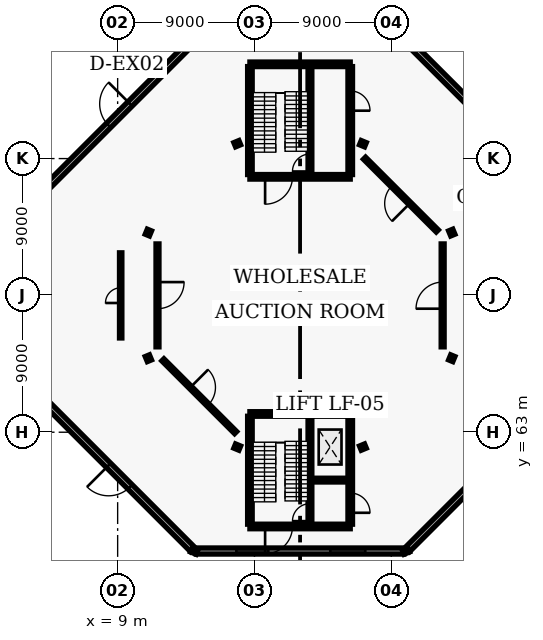
"""IFC4 building model, lengths in metres.
Left out: names, types, materials, properties, quantities, classifications, styles, units other than length and angle.
Written with IfcOpenShell. Run it as: python <this file> out.ifc"""

import sys

from ifc_helpers import new_model, si_unit, direction, frame, frame_2d, origin, origin_2d, place, context, subcontext, project, spatial, rectangle, i_section, extrude, element, fill, save


model = new_model("IFC4")
c1 = context("Model", 3, precision=1e-05, world=origin(), true_north=direction((0.0, 1.0)))
c2 = subcontext(c1, "Body", "Model", "MODEL_VIEW")
j1 = project(units=[si_unit("LENGTHUNIT", "METRE"), si_unit("PLANEANGLEUNIT", "RADIAN")], contexts=[c1])
p1 = place(None, origin())
s1 = spatial("IfcSite", under=j1, at=p1, CompositionType="ELEMENT")
p2 = place(p1, origin())
s2 = spatial("IfcBuilding", under=s1, at=p2, CompositionType="ELEMENT")
p3 = place(p2, origin())
s3 = spatial("IfcBuildingStorey", under=s2, at=p3, CompositionType="ELEMENT", Elevation=0.0)
for number, where, z_axis, x_axis in (
    (1, (30.978, 76.133, 0.0), (0.0, 0.0, 1.0), (0.924, 0.383, 0.0)),
    (2, (25.133, 81.978, 0.0), (0.0, 0.0, 1.0), (0.383, 0.924, 0.0)),
    (3, (16.867, 81.978, 0.0), (0.0, 0.0, 1.0), (-0.383, 0.924, 0.0)),
    (4, (11.022, 76.133, 0.0), (0.0, 0.0, 1.0), (-0.924, 0.383, 0.0)),
    (5, (11.022, 67.867, 0.0), (0.0, 0.0, 1.0), (-0.924, -0.383, 0.0)),
    (6, (16.867, 62.022, 0.0), (0.0, 0.0, 1.0), (-0.383, -0.924, 0.0)),
):
    element("IfcColumn", number, at=place(p3, frame(where, z_axis=z_axis, x_axis=x_axis)), inside=s3, PredefinedType="COLUMN", context=c2, shape_type="SweptSolid", body=[
        extrude(i_section(OverallWidth=0.3, OverallDepth=0.36, WebThickness=0.012, FlangeThickness=0.022, FilletRadius=0.027, at=origin_2d()), origin(), (0.0, 0.0, 1.0), 5.4),
    ])
p4 = place(p3, frame((14.035, 55.185, 0.0), z_axis=(0.0, 0.0, 1.0), x_axis=(-0.382683432365, -0.923879532511, 0.0)))
e7 = element("IfcColumn", 7, at=p4, inside=s3, PredefinedType="COLUMN", context=c2, shape_type="SweptSolid", body=[
    extrude(i_section(OverallWidth=0.3, OverallDepth=0.4, WebThickness=0.013, FlangeThickness=0.024, FilletRadius=0.027, at=origin_2d()), origin(), (0.0, 0.0, 1.0), 5.4),
])
p5 = place(p3, frame((25.133, 62.022, 0.0), z_axis=(0.0, 0.0, 1.0), x_axis=(0.382683432365, -0.923879532511, 0.0)))
e8 = element("IfcColumn", 8, at=p5, inside=s3, PredefinedType="COLUMN", context=c2, shape_type="SweptSolid", body=[
    extrude(i_section(OverallWidth=0.3, OverallDepth=0.36, WebThickness=0.012, FlangeThickness=0.022, FilletRadius=0.027, at=origin_2d()), origin(), (0.0, 0.0, 1.0), 5.4),
])
p6 = place(p3, frame((27.965, 55.185, 0.0), z_axis=(0.0, 0.0, 1.0), x_axis=(0.382683432365, -0.923879532511, 0.0)))
e9 = element("IfcColumn", 9, at=p6, inside=s3, PredefinedType="COLUMN", context=c2, shape_type="SweptSolid", body=[
    extrude(i_section(OverallWidth=0.3, OverallDepth=0.4, WebThickness=0.013, FlangeThickness=0.024, FilletRadius=0.027, at=origin_2d()), origin(), (0.0, 0.0, 1.0), 5.4),
])
p7 = place(p3, frame((30.978, 67.867, 0.0), z_axis=(0.0, 0.0, 1.0), x_axis=(0.923879532511, -0.382683432365, 0.0)))
e10 = element("IfcColumn", 10, at=p7, inside=s3, PredefinedType="COLUMN", context=c2, shape_type="SweptSolid", body=[
    extrude(i_section(OverallWidth=0.3, OverallDepth=0.36, WebThickness=0.012, FlangeThickness=0.022, FilletRadius=0.027, at=origin_2d()), origin(), (0.0, 0.0, 1.0), 5.4),
])
p8 = place(p3, frame((37.716, 79.064, 0.0), z_axis=(0.0, 0.0, 1.0), x_axis=(-0.707106781187, 0.707106781187, 0.0)))
e11 = element("IfcWall", 11, at=p8, inside=s3, PredefinedType="SOLIDWALL", context=c2, shape_type="SweptSolid", body=[
    extrude(rectangle(XDim=13.65, YDim=0.4, at=frame_2d((6.825, 0.0))), origin(), (0.0, 0.0, 1.0), 4.35),
])
p9 = place(p8, frame((5.825, 0.0, 0.0)))
e12 = element("IfcOpeningElement", 12, at=p9, cuts=e11, PredefinedType="OPENING", context=c2, shape_type="SweptSolid", body=[
    extrude(rectangle(XDim=2.0, YDim=2.3, at=frame_2d((1.0, 1.15))), frame((0.0, 0.21, 0.0), z_axis=(0.0, -1.0, 0.0), x_axis=(1.0, 0.0, 0.0)), (0.0, 0.0, 1.0), 0.42),
])
p10 = place(p3, frame((13.936, 88.716, 0.0), z_axis=(0.0, 0.0, 1.0), x_axis=(-0.707106781187, -0.707106781187, 0.0)))
e13 = element("IfcWall", 13, at=p10, inside=s3, PredefinedType="SOLIDWALL", context=c2, shape_type="SweptSolid", body=[
    extrude(rectangle(XDim=13.65, YDim=0.4, at=frame_2d((6.825, 0.0))), origin(), (0.0, 0.0, 1.0), 4.35),
])
p11 = place(p10, frame((5.825, 0.0, 0.0)))
e14 = element("IfcOpeningElement", 14, at=p11, cuts=e13, PredefinedType="OPENING", context=c2, shape_type="SweptSolid", body=[
    extrude(rectangle(XDim=2.0, YDim=2.3, at=frame_2d((1.0, 1.15))), frame((0.0, 0.21, 0.0), z_axis=(0.0, -1.0, 0.0), x_axis=(1.0, 0.0, 0.0)), (0.0, 0.0, 1.0), 0.42),
])
p12 = place(p3, frame((4.284, 64.936, 0.0), z_axis=(0.0, 0.0, 1.0), x_axis=(0.707106781187, -0.707106781187, 0.0)))
e15 = element("IfcWall", 15, at=p12, inside=s3, PredefinedType="SOLIDWALL", context=c2, shape_type="SweptSolid", body=[
    extrude(rectangle(XDim=13.65, YDim=0.4, at=frame_2d((6.825, 0.0))), origin(), (0.0, 0.0, 1.0), 4.35),
])
p13 = place(p12, frame((5.825, 0.0, 0.0)))
e16 = element("IfcOpeningElement", 16, at=p13, cuts=e15, PredefinedType="OPENING", context=c2, shape_type="SweptSolid", body=[
    extrude(rectangle(XDim=2.0, YDim=2.3, at=frame_2d((1.0, 1.15))), frame((0.0, 0.21, 0.0), z_axis=(0.0, -1.0, 0.0), x_axis=(1.0, 0.0, 0.0)), (0.0, 0.0, 1.0), 0.42),
])
p14 = place(p3, frame((14.175, 55.185, 0.0), z_axis=(0.0, 0.0, 1.0), x_axis=(1.0, 0.0, 0.0)))
e17 = element("IfcWall", 17, at=p14, inside=s3, PredefinedType="SOLIDWALL", context=c2, shape_type="SweptSolid", body=[
    extrude(rectangle(XDim=13.65, YDim=0.4, at=frame_2d((6.825, 0.0))), origin(), (0.0, 0.0, 1.0), 4.35),
])
p15 = place(p14, frame((2.635, 0.0, 0.95)))
e18 = element("IfcOpeningElement", 18, at=p15, cuts=e17, PredefinedType="OPENING", context=c2, shape_type="SweptSolid", body=[
    extrude(rectangle(XDim=2.1, YDim=2.1, at=frame_2d((1.05, 1.05))), frame((0.0, 0.21, 0.0), z_axis=(0.0, -1.0, 0.0), x_axis=(1.0, 0.0, 0.0)), (0.0, 0.0, 1.0), 0.42),
])
p16 = place(p14, frame((8.814, 0.0, 0.95)))
e19 = element("IfcOpeningElement", 19, at=p16, cuts=e17, PredefinedType="OPENING", context=c2, shape_type="SweptSolid", body=[
    extrude(rectangle(XDim=2.3, YDim=1.65, at=frame_2d((1.15, 0.825))), frame((0.0, 0.21, 0.0), z_axis=(0.0, -1.0, 0.0), x_axis=(1.0, 0.0, 0.0)), (0.0, 0.0, 1.0), 0.42),
])
p17 = place(p3, frame((28.064, 55.284, 0.0), z_axis=(0.0, 0.0, 1.0), x_axis=(0.707106781187, 0.707106781187, 0.0)))
e20 = element("IfcWall", 20, at=p17, inside=s3, PredefinedType="SOLIDWALL", context=c2, shape_type="SweptSolid", body=[
    extrude(rectangle(XDim=13.65, YDim=0.4, at=frame_2d((6.825, 0.0))), origin(), (0.0, 0.0, 1.0), 4.35),
])
p18 = place(p17, frame((5.825, 0.0, 0.0)))
e21 = element("IfcOpeningElement", 21, at=p18, cuts=e20, PredefinedType="OPENING", context=c2, shape_type="SweptSolid", body=[
    extrude(rectangle(XDim=2.0, YDim=2.3, at=frame_2d((1.0, 1.15))), frame((0.0, 0.21, 0.0), z_axis=(0.0, -1.0, 0.0), x_axis=(1.0, 0.0, 0.0)), (0.0, 0.0, 1.0), 0.42),
])
p19 = place(p3, frame((17.7, 56.8, 0.0), z_axis=(0.0, 0.0, 1.0), x_axis=(1.0, 0.0, 0.0)))
e22 = element("IfcWall", 22, at=p19, inside=s3, PredefinedType="SHEAR", context=c2, shape_type="SweptSolid", body=[
    extrude(rectangle(XDim=6.6, YDim=0.3, at=frame_2d((3.3, 0.0))), origin(), (0.0, 0.0, 1.0), 5.4),
])
p20 = place(p19, frame((1.0, 0.0, 0.0)))
e23 = element("IfcOpeningElement", 23, at=p20, cuts=e22, PredefinedType="OPENING", context=c2, shape_type="SweptSolid", body=[
    extrude(rectangle(XDim=1.8, YDim=2.15, at=frame_2d((0.9, 1.075))), frame((0.0, 0.16, 0.0), z_axis=(0.0, -1.0, 0.0), x_axis=(1.0, 0.0, 0.0)), (0.0, 0.0, 1.0), 0.32),
])
p21 = place(p3, frame((17.7, 64.2, 0.0), z_axis=(0.0, 0.0, 1.0), x_axis=(1.0, 0.0, 0.0)))
e24 = element("IfcWall", 24, at=p21, inside=s3, PredefinedType="SHEAR", context=c2, shape_type="SweptSolid", body=[
    extrude(rectangle(XDim=6.6, YDim=0.3, at=frame_2d((3.3, 0.0))), origin(), (0.0, 0.0, 1.0), 5.4),
])
p22 = place(p3, frame((17.7, 56.95, 0.0), z_axis=(0.0, 0.0, 1.0), x_axis=(0.0, 1.0, 0.0)))
e25 = element("IfcWall", 25, at=p22, inside=s3, PredefinedType="SHEAR", context=c2, shape_type="SweptSolid", body=[
    extrude(rectangle(XDim=7.1, YDim=0.3, at=frame_2d((3.55, 0.0))), origin(), (0.0, 0.0, 1.0), 5.4),
])
p23 = place(p3, frame((24.3, 56.95, 0.0), z_axis=(0.0, 0.0, 1.0), x_axis=(0.0, 1.0, 0.0)))
e26 = element("IfcWall", 26, at=p23, inside=s3, PredefinedType="SHEAR", context=c2, shape_type="SweptSolid", body=[
    extrude(rectangle(XDim=7.1, YDim=0.3, at=frame_2d((3.55, 0.0))), origin(), (0.0, 0.0, 1.0), 5.4),
])
p24 = place(p23, frame((0.75, 0.0, 0.0)))
e27 = element("IfcOpeningElement", 27, at=p24, cuts=e26, PredefinedType="OPENING", context=c2, shape_type="SweptSolid", body=[
    extrude(rectangle(XDim=1.3, YDim=2.15, at=frame_2d((0.65, 1.075))), frame((0.0, 0.16, 0.0), z_axis=(0.0, -1.0, 0.0), x_axis=(1.0, 0.0, 0.0)), (0.0, 0.0, 1.0), 0.32),
])
p25 = place(p3, frame((21.65, 56.95, 0.0), z_axis=(0.0, 0.0, 1.0), x_axis=(0.0, 1.0, 0.0)))
e28 = element("IfcWall", 28, at=p25, inside=s3, PredefinedType="SHEAR", context=c2, shape_type="SweptSolid", body=[
    extrude(rectangle(XDim=7.1, YDim=0.25, at=frame_2d((3.55, 0.0))), origin(), (0.0, 0.0, 1.0), 5.4),
])
p26 = place(p25, frame((0.2, 0.0, 0.0)))
e29 = element("IfcOpeningElement", 29, at=p26, cuts=e28, PredefinedType="OPENING", context=c2, shape_type="SweptSolid", body=[
    extrude(rectangle(XDim=1.15, YDim=2.15, at=frame_2d((0.575, 1.075))), frame((0.0, 0.135, 0.0), z_axis=(0.0, -1.0, 0.0), x_axis=(1.0, 0.0, 0.0)), (0.0, 0.0, 1.0), 0.27),
])
p27 = place(p3, frame((21.77, 59.85, 0.0), z_axis=(0.0, 0.0, 1.0), x_axis=(1.0, 0.0, 0.0)))
e30 = element("IfcWall", 30, at=p27, inside=s3, PredefinedType="SHEAR", context=c2, shape_type="SweptSolid", body=[
    extrude(rectangle(XDim=2.38, YDim=0.25, at=frame_2d((1.19, 0.0))), origin(), (0.0, 0.0, 1.0), 5.4),
])
p28 = place(p27, frame((0.64, 0.0, 0.0)))
e31 = element("IfcOpeningElement", 31, at=p28, cuts=e30, PredefinedType="OPENING", context=c2, shape_type="SweptSolid", body=[
    extrude(rectangle(XDim=1.1, YDim=2.15, at=frame_2d((0.55, 1.075))), frame((0.0, 0.135, 0.0), z_axis=(0.0, -1.0, 0.0), x_axis=(1.0, 0.0, 0.0)), (0.0, 0.0, 1.0), 0.27),
])
p29 = place(p3, frame((17.7, 79.8, 0.0), z_axis=(0.0, 0.0, 1.0), x_axis=(1.0, 0.0, 0.0)))
e32 = element("IfcWall", 32, at=p29, inside=s3, PredefinedType="SHEAR", context=c2, shape_type="SweptSolid", body=[
    extrude(rectangle(XDim=6.6, YDim=0.3, at=frame_2d((3.3, 0.0))), origin(), (0.0, 0.0, 1.0), 5.4),
])
p30 = place(p29, frame((1.0, 0.0, 0.0)))
e33 = element("IfcOpeningElement", 33, at=p30, cuts=e32, PredefinedType="OPENING", context=c2, shape_type="SweptSolid", body=[
    extrude(rectangle(XDim=1.8, YDim=2.15, at=frame_2d((0.9, 1.075))), frame((0.0, 0.16, 0.0), z_axis=(0.0, -1.0, 0.0), x_axis=(1.0, 0.0, 0.0)), (0.0, 0.0, 1.0), 0.32),
])
p31 = place(p3, frame((17.7, 87.2, 0.0), z_axis=(0.0, 0.0, 1.0), x_axis=(1.0, 0.0, 0.0)))
e34 = element("IfcWall", 34, at=p31, inside=s3, PredefinedType="SHEAR", context=c2, shape_type="SweptSolid", body=[
    extrude(rectangle(XDim=6.6, YDim=0.3, at=frame_2d((3.3, 0.0))), origin(), (0.0, 0.0, 1.0), 5.4),
])
p32 = place(p3, frame((17.7, 79.95, 0.0), z_axis=(0.0, 0.0, 1.0), x_axis=(0.0, 1.0, 0.0)))
e35 = element("IfcWall", 35, at=p32, inside=s3, PredefinedType="SHEAR", context=c2, shape_type="SweptSolid", body=[
    extrude(rectangle(XDim=7.1, YDim=0.3, at=frame_2d((3.55, 0.0))), origin(), (0.0, 0.0, 1.0), 5.4),
])
p33 = place(p3, frame((24.3, 79.95, 0.0), z_axis=(0.0, 0.0, 1.0), x_axis=(0.0, 1.0, 0.0)))
e36 = element("IfcWall", 36, at=p33, inside=s3, PredefinedType="SHEAR", context=c2, shape_type="SweptSolid", body=[
    extrude(rectangle(XDim=7.1, YDim=0.3, at=frame_2d((3.55, 0.0))), origin(), (0.0, 0.0, 1.0), 5.4),
])
p34 = place(p33, frame((4.2, 0.0, 0.0)))
e37 = element("IfcOpeningElement", 37, at=p34, cuts=e36, PredefinedType="OPENING", context=c2, shape_type="SweptSolid", body=[
    extrude(rectangle(XDim=1.3, YDim=2.15, at=frame_2d((0.65, 1.075))), frame((0.0, 0.16, 0.0), z_axis=(0.0, -1.0, 0.0), x_axis=(1.0, 0.0, 0.0)), (0.0, 0.0, 1.0), 0.32),
])
p35 = place(p3, frame((21.65, 79.95, 0.0), z_axis=(0.0, 0.0, 1.0), x_axis=(0.0, 1.0, 0.0)))
e38 = element("IfcWall", 38, at=p35, inside=s3, PredefinedType="SHEAR", context=c2, shape_type="SweptSolid", body=[
    extrude(rectangle(XDim=7.1, YDim=0.25, at=frame_2d((3.55, 0.0))), origin(), (0.0, 0.0, 1.0), 5.4),
])
p36 = place(p35, frame((0.2, 0.0, 0.0)))
e39 = element("IfcOpeningElement", 39, at=p36, cuts=e38, PredefinedType="OPENING", context=c2, shape_type="SweptSolid", body=[
    extrude(rectangle(XDim=1.15, YDim=2.15, at=frame_2d((0.575, 1.075))), frame((0.0, 0.135, 0.0), z_axis=(0.0, -1.0, 0.0), x_axis=(1.0, 0.0, 0.0)), (0.0, 0.0, 1.0), 0.27),
])
p37 = place(p3, frame((30.025, 76.239, 0.0), z_axis=(0.0, 0.0, 1.0), x_axis=(-0.707106781187, 0.707106781187, 0.0)))
e40 = element("IfcWall", 40, at=p37, inside=s3, PredefinedType="PARTITIONING", context=c2, shape_type="SweptSolid", body=[
    extrude(rectangle(XDim=6.768, YDim=0.195, at=frame_2d((3.384, 0.0))), origin(), (0.0, 0.0, 1.0), 4.3),
])
p38 = place(p37, frame((2.559, 0.0, 0.0)))
e41 = element("IfcOpeningElement", 41, at=p38, cuts=e40, PredefinedType="OPENING", context=c2, shape_type="SweptSolid", body=[
    extrude(rectangle(XDim=1.65, YDim=2.25, at=frame_2d((0.825, 1.125))), frame((0.0, 0.107, 0.0), z_axis=(0.0, -1.0, 0.0), x_axis=(1.0, 0.0, 0.0)), (0.0, 0.0, 1.0), 0.215),
])
p39 = place(p3, frame((11.621, 75.385, 0.0), z_axis=(0.0, 0.0, 1.0), x_axis=(0.0, -1.0, 0.0)))
e42 = element("IfcWall", 42, at=p39, inside=s3, PredefinedType="PARTITIONING", context=c2, shape_type="SweptSolid", body=[
    extrude(rectangle(XDim=6.77, YDim=0.195, at=frame_2d((3.385, 0.0))), origin(), (0.0, 0.0, 1.0), 4.3),
])
p40 = place(p39, frame((2.51, 0.0, 0.0)))
e43 = element("IfcOpeningElement", 43, at=p40, cuts=e42, PredefinedType="OPENING", context=c2, shape_type="SweptSolid", body=[
    extrude(rectangle(XDim=1.75, YDim=2.3, at=frame_2d((0.875, 1.15))), frame((0.0, 0.107, 0.0), z_axis=(0.0, -1.0, 0.0), x_axis=(1.0, 0.0, 0.0)), (0.0, 0.0, 1.0), 0.215),
])
p41 = place(p3, frame((11.975, 67.761, 0.0), z_axis=(0.0, 0.0, 1.0), x_axis=(0.707106781187, -0.707106781187, 0.0)))
e44 = element("IfcWall", 44, at=p41, inside=s3, PredefinedType="PARTITIONING", context=c2, shape_type="SweptSolid", body=[
    extrude(rectangle(XDim=6.768, YDim=0.195, at=frame_2d((3.384, 0.0))), origin(), (0.0, 0.0, 1.0), 4.3),
])
p42 = place(p41, frame((2.559, 0.0, 0.0)))
e45 = element("IfcOpeningElement", 45, at=p42, cuts=e44, PredefinedType="OPENING", context=c2, shape_type="SweptSolid", body=[
    extrude(rectangle(XDim=1.65, YDim=2.25, at=frame_2d((0.825, 1.125))), frame((0.0, 0.107, 0.0), z_axis=(0.0, -1.0, 0.0), x_axis=(1.0, 0.0, 0.0)), (0.0, 0.0, 1.0), 0.215),
])
p43 = place(p3, frame((30.379, 68.615, 0.0), z_axis=(0.0, 0.0, 1.0), x_axis=(0.0, 1.0, 0.0)))
e46 = element("IfcWall", 46, at=p43, inside=s3, PredefinedType="PARTITIONING", context=c2, shape_type="SweptSolid", body=[
    extrude(rectangle(XDim=6.77, YDim=0.195, at=frame_2d((3.385, 0.0))), origin(), (0.0, 0.0, 1.0), 4.3),
])
p44 = place(p43, frame((2.51, 0.0, 0.0)))
e47 = element("IfcOpeningElement", 47, at=p44, cuts=e46, PredefinedType="OPENING", context=c2, shape_type="SweptSolid", body=[
    extrude(rectangle(XDim=1.75, YDim=2.3, at=frame_2d((0.875, 1.15))), frame((0.0, 0.107, 0.0), z_axis=(0.0, -1.0, 0.0), x_axis=(1.0, 0.0, 0.0)), (0.0, 0.0, 1.0), 0.215),
])
p45 = place(p3, frame((9.2, 69.2, 0.0), z_axis=(0.0, 0.0, 1.0), x_axis=(0.0, 1.0, 0.0)))
e48 = element("IfcWall", 48, at=p45, inside=s3, PredefinedType="PARTITIONING", context=c2, shape_type="SweptSolid", body=[
    extrude(rectangle(XDim=5.6, YDim=0.155, at=frame_2d((2.8, 0.0))), origin(), (0.0, 0.0, 1.0), 4.3),
])
p46 = place(p45, frame((2.3, 0.0, 0.0)))
e49 = element("IfcOpeningElement", 49, at=p46, cuts=e48, PredefinedType="OPENING", context=c2, shape_type="SweptSolid", body=[
    extrude(rectangle(XDim=1.0, YDim=2.1, at=frame_2d((0.5, 1.05))), frame((0.0, 0.087, 0.0), z_axis=(0.0, -1.0, 0.0), x_axis=(1.0, 0.0, 0.0)), (0.0, 0.0, 1.0), 0.175),
])
p47 = place(p11, frame((2.0, 0.0, 0.0), z_axis=(0.0, 0.0, 1.0), x_axis=(-1.0, 0.0, 0.0)))
e50 = element("IfcDoor", 50, at=p47, inside=s3, OperationType="DOUBLE_DOOR_SINGLE_SWING", PredefinedType="DOOR", context=c2, shape_type="SweptSolid", body=[
    extrude(rectangle(XDim=2.0, YDim=2.3, at=frame_2d((1.0, 1.15))), frame((0.0, 0.025, 0.0), z_axis=(0.0, -1.0, 0.0), x_axis=(1.0, 0.0, 0.0)), (0.0, 0.0, 1.0), 0.05),
])
fill(e14, e50)
p48 = place(p13, frame((2.0, 0.0, 0.0), z_axis=(0.0, 0.0, 1.0), x_axis=(-1.0, 0.0, 0.0)))
e51 = element("IfcDoor", 51, at=p48, inside=s3, OperationType="DOUBLE_DOOR_SINGLE_SWING", PredefinedType="DOOR", context=c2, shape_type="SweptSolid", body=[
    extrude(rectangle(XDim=2.0, YDim=2.3, at=frame_2d((1.0, 1.15))), frame((0.0, 0.025, 0.0), z_axis=(0.0, -1.0, 0.0), x_axis=(1.0, 0.0, 0.0)), (0.0, 0.0, 1.0), 0.05),
])
fill(e16, e51)
p49 = place(p15, origin())
e52 = element("IfcWindow", 52, at=p49, inside=s3, PartitioningType="SINGLE_PANEL", PredefinedType="WINDOW", context=c2, shape_type="SweptSolid", body=[
    extrude(rectangle(XDim=2.1, YDim=2.1, at=frame_2d((1.05, 1.05))), frame((0.0, 0.03, 0.0), z_axis=(0.0, -1.0, 0.0), x_axis=(1.0, 0.0, 0.0)), (0.0, 0.0, 1.0), 0.06),
])
fill(e18, e52)
p50 = place(p16, origin())
e53 = element("IfcWindow", 53, at=p50, inside=s3, PartitioningType="SINGLE_PANEL", PredefinedType="WINDOW", context=c2, shape_type="SweptSolid", body=[
    extrude(rectangle(XDim=2.3, YDim=1.65, at=frame_2d((1.15, 0.825))), frame((0.0, 0.03, 0.0), z_axis=(0.0, -1.0, 0.0), x_axis=(1.0, 0.0, 0.0)), (0.0, 0.0, 1.0), 0.06),
])
fill(e19, e53)
p51 = place(p24, frame((1.3, 0.0, 0.0), z_axis=(0.0, 0.0, 1.0), x_axis=(-1.0, 0.0, 0.0)))
e54 = element("IfcDoor", 54, at=p51, inside=s3, OperationType="DOUBLE_DOOR_SINGLE_SWING", PredefinedType="DOOR", context=c2, shape_type="SweptSolid", body=[
    extrude(rectangle(XDim=1.3, YDim=2.15, at=frame_2d((0.65, 1.075))), frame((0.0, 0.025, 0.0), z_axis=(0.0, -1.0, 0.0), x_axis=(1.0, 0.0, 0.0)), (0.0, 0.0, 1.0), 0.05),
])
fill(e27, e54)
p52 = place(p26, origin())
e55 = element("IfcDoor", 55, at=p52, inside=s3, OperationType="SINGLE_SWING_LEFT", PredefinedType="DOOR", context=c2, shape_type="SweptSolid", body=[
    extrude(rectangle(XDim=1.15, YDim=2.15, at=frame_2d((0.575, 1.075))), frame((0.0, 0.025, 0.0), z_axis=(0.0, -1.0, 0.0), x_axis=(1.0, 0.0, 0.0)), (0.0, 0.0, 1.0), 0.05),
])
fill(e29, e55)
p53 = place(p20, frame((1.8, 0.0, 0.0), z_axis=(0.0, 0.0, 1.0), x_axis=(-1.0, 0.0, 0.0)))
e56 = element("IfcDoor", 56, at=p53, inside=s3, OperationType="DOUBLE_DOOR_SINGLE_SWING", PredefinedType="DOOR", context=c2, shape_type="SweptSolid", body=[
    extrude(rectangle(XDim=1.8, YDim=2.15, at=frame_2d((0.9, 1.075))), frame((0.0, 0.025, 0.0), z_axis=(0.0, -1.0, 0.0), x_axis=(1.0, 0.0, 0.0)), (0.0, 0.0, 1.0), 0.05),
])
fill(e23, e56)
p54 = place(p28, origin())
e57 = element("IfcDoor", 57, at=p54, inside=s3, OperationType="SLIDING_TO_LEFT", PredefinedType="DOOR", context=c2, shape_type="SweptSolid", body=[
    extrude(rectangle(XDim=1.1, YDim=2.15, at=frame_2d((0.55, 1.075))), frame((0.0, 0.025, 0.0), z_axis=(0.0, -1.0, 0.0), x_axis=(1.0, 0.0, 0.0)), (0.0, 0.0, 1.0), 0.05),
])
fill(e31, e57)
p55 = place(p34, frame((1.3, 0.0, 0.0), z_axis=(0.0, 0.0, 1.0), x_axis=(-1.0, 0.0, 0.0)))
e58 = element("IfcDoor", 58, at=p55, inside=s3, OperationType="DOUBLE_DOOR_SINGLE_SWING", PredefinedType="DOOR", context=c2, shape_type="SweptSolid", body=[
    extrude(rectangle(XDim=1.3, YDim=2.15, at=frame_2d((0.65, 1.075))), frame((0.0, 0.025, 0.0), z_axis=(0.0, -1.0, 0.0), x_axis=(1.0, 0.0, 0.0)), (0.0, 0.0, 1.0), 0.05),
])
fill(e37, e58)
p56 = place(p36, origin())
e59 = element("IfcDoor", 59, at=p56, inside=s3, OperationType="SINGLE_SWING_LEFT", PredefinedType="DOOR", context=c2, shape_type="SweptSolid", body=[
    extrude(rectangle(XDim=1.15, YDim=2.15, at=frame_2d((0.575, 1.075))), frame((0.0, 0.025, 0.0), z_axis=(0.0, -1.0, 0.0), x_axis=(1.0, 0.0, 0.0)), (0.0, 0.0, 1.0), 0.05),
])
fill(e39, e59)
p57 = place(p30, frame((1.8, 0.0, 0.0), z_axis=(0.0, 0.0, 1.0), x_axis=(-1.0, 0.0, 0.0)))
e60 = element("IfcDoor", 60, at=p57, inside=s3, OperationType="DOUBLE_DOOR_SINGLE_SWING", PredefinedType="DOOR", context=c2, shape_type="SweptSolid", body=[
    extrude(rectangle(XDim=1.8, YDim=2.15, at=frame_2d((0.9, 1.075))), frame((0.0, 0.025, 0.0), z_axis=(0.0, -1.0, 0.0), x_axis=(1.0, 0.0, 0.0)), (0.0, 0.0, 1.0), 0.05),
])
fill(e33, e60)
p58 = place(p38, origin())
e61 = element("IfcDoor", 61, at=p58, inside=s3, OperationType="DOUBLE_DOOR_SINGLE_SWING", PredefinedType="DOOR", context=c2, shape_type="SweptSolid", body=[
    extrude(rectangle(XDim=1.65, YDim=2.25, at=frame_2d((0.825, 1.125))), frame((0.0, 0.025, 0.0), z_axis=(0.0, -1.0, 0.0), x_axis=(1.0, 0.0, 0.0)), (0.0, 0.0, 1.0), 0.05),
])
fill(e41, e61)
p59 = place(p40, origin())
e62 = element("IfcDoor", 62, at=p59, inside=s3, OperationType="DOUBLE_DOOR_SINGLE_SWING", PredefinedType="DOOR", context=c2, shape_type="SweptSolid", body=[
    extrude(rectangle(XDim=1.75, YDim=2.3, at=frame_2d((0.875, 1.15))), frame((0.0, 0.025, 0.0), z_axis=(0.0, -1.0, 0.0), x_axis=(1.0, 0.0, 0.0)), (0.0, 0.0, 1.0), 0.05),
])
fill(e43, e62)
p60 = place(p42, origin())
e63 = element("IfcDoor", 63, at=p60, inside=s3, OperationType="DOUBLE_DOOR_SINGLE_SWING", PredefinedType="DOOR", context=c2, shape_type="SweptSolid", body=[
    extrude(rectangle(XDim=1.65, YDim=2.25, at=frame_2d((0.825, 1.125))), frame((0.0, 0.025, 0.0), z_axis=(0.0, -1.0, 0.0), x_axis=(1.0, 0.0, 0.0)), (0.0, 0.0, 1.0), 0.05),
])
fill(e45, e63)
p61 = place(p44, origin())
e64 = element("IfcDoor", 64, at=p61, inside=s3, OperationType="DOUBLE_DOOR_SINGLE_SWING", PredefinedType="DOOR", context=c2, shape_type="SweptSolid", body=[
    extrude(rectangle(XDim=1.75, YDim=2.3, at=frame_2d((0.875, 1.15))), frame((0.0, 0.025, 0.0), z_axis=(0.0, -1.0, 0.0), x_axis=(1.0, 0.0, 0.0)), (0.0, 0.0, 1.0), 0.05),
])
fill(e47, e64)
p62 = place(p46, origin())
e65 = element("IfcDoor", 65, at=p62, inside=s3, OperationType="SINGLE_SWING_LEFT", PredefinedType="DOOR", context=c2, shape_type="SweptSolid", body=[
    extrude(rectangle(XDim=1.0, YDim=2.1, at=frame_2d((0.5, 1.05))), frame((0.0, 0.025, 0.0), z_axis=(0.0, -1.0, 0.0), x_axis=(1.0, 0.0, 0.0)), (0.0, 0.0, 1.0), 0.05),
])
fill(e49, e65)
save(model, sys.argv[1])
